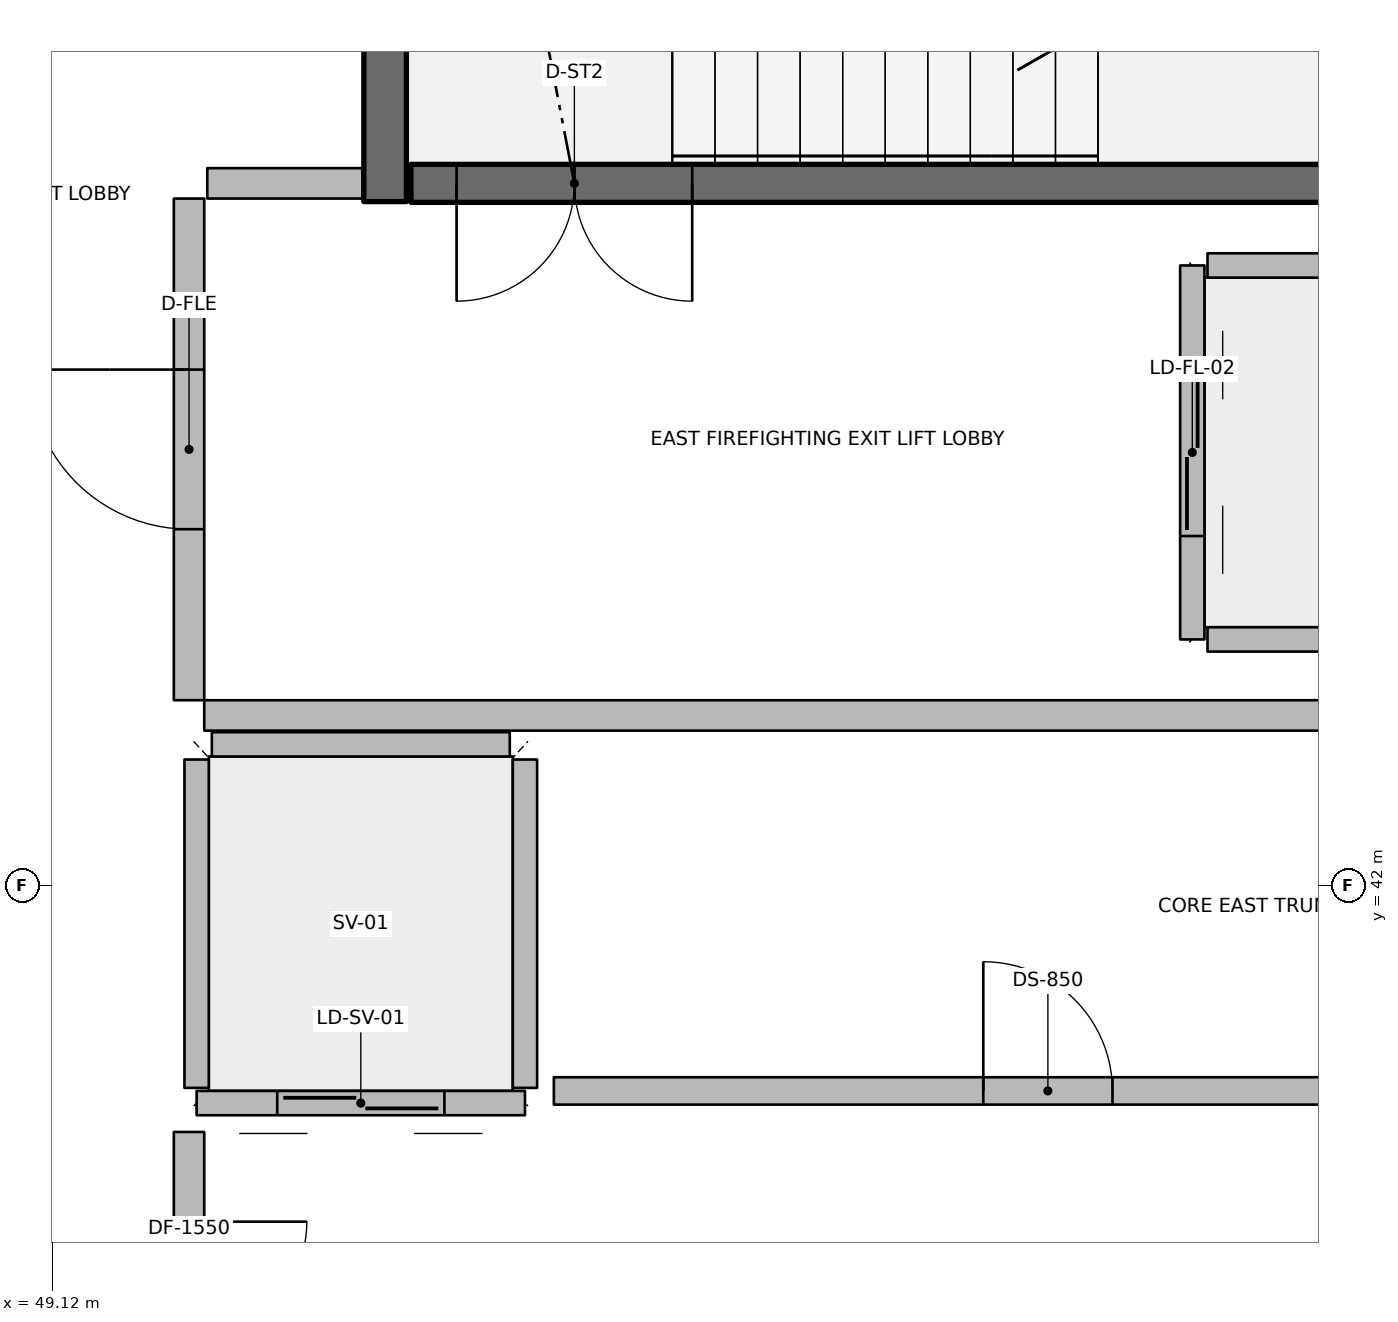
"""IFC4 building model, lengths in metres.
Left out: names, types, materials, properties, quantities, classifications, styles, units other than length and angle.
Written with IfcOpenShell. Run it as: python <this file> out.ifc"""

import sys

from ifc_helpers import new_model, si_unit, direction, frame, frame_2d, origin, origin_2d, place, context, subcontext, project, spatial, rectangle, hollow_rectangle, extrude, element, fill, save


model = new_model("IFC4")
c1 = context("Model", 3, precision=1e-05, world=origin(), true_north=direction((0.0, 1.0)))
c2 = subcontext(c1, "Body", "Model", "MODEL_VIEW")
j1 = project(units=[si_unit("LENGTHUNIT", "METRE"), si_unit("PLANEANGLEUNIT", "RADIAN")], contexts=[c1])
p1 = place(None, origin())
s1 = spatial("IfcSite", under=j1, at=p1, CompositionType="ELEMENT")
p2 = place(p1, origin())
s2 = spatial("IfcBuilding", under=s1, at=p2, CompositionType="ELEMENT")
p3 = place(p2, origin())
s3 = spatial("IfcBuildingStorey", under=s2, at=p3, CompositionType="ELEMENT", Elevation=0.0)
p4 = place(p3, frame((51.31, 46.5, 0.0), z_axis=(0.0, 0.0, 1.0), x_axis=(0.0, 1.0, 0.0)))
e1 = element("IfcWall", 1, at=p4, inside=s3, PredefinedType="SHEAR", context=c2, shape_type="SweptSolid", body=[
    extrude(rectangle(XDim=3.5, YDim=0.28, at=frame_2d((1.75, 0.0))), origin(), (0.0, 0.0, 1.0), 7.2),
])
p5 = place(p3, frame((56.0, 46.62, 0.0), z_axis=(0.0, 0.0, 1.0), x_axis=(1.0, 0.0, 0.0)))
e2 = element("IfcColumn", 2, at=p5, inside=s3, PredefinedType="COLUMN", context=c2, shape_type="SweptSolid", body=[
    extrude(hollow_rectangle(XDim=0.2, YDim=0.2, WallThickness=0.01, InnerFilletRadius=0.01, OuterFilletRadius=0.02, at=origin_2d()), origin(), (0.0, 0.0, 1.0), 1.595),
])
p6 = place(p3, frame((56.7, 46.62, 0.0), z_axis=(0.0, 0.0, 1.0), x_axis=(1.0, 0.0, 0.0)))
e3 = element("IfcColumn", 3, at=p6, inside=s3, PredefinedType="COLUMN", context=c2, shape_type="SweptSolid", body=[
    extrude(hollow_rectangle(XDim=0.2, YDim=0.2, WallThickness=0.01, InnerFilletRadius=0.01, OuterFilletRadius=0.02, at=origin_2d()), origin(), (0.0, 0.0, 1.0), 5.195),
])
p7 = place(p3, frame((51.48, 46.62, 0.0), z_axis=(0.0, 0.0, 1.0), x_axis=(1.0, 0.0, 0.0)))
e4 = element("IfcWall", 4, at=p7, inside=s3, PredefinedType="SOLIDWALL", context=c2, shape_type="SweptSolid", body=[
    extrude(rectangle(XDim=7.54, YDim=0.25, at=frame_2d((3.77, 0.0))), origin(), (0.0, 0.0, 1.0), 6.8),
])
p8 = place(p7, frame((0.3, 0.0, 0.0)))
e5 = element("IfcOpeningElement", 5, at=p8, cuts=e4, PredefinedType="OPENING", context=c2, shape_type="SweptSolid", body=[
    extrude(rectangle(XDim=1.55, YDim=2.15, at=frame_2d((0.775, 1.075))), frame((0.0, 0.135, 0.0), z_axis=(0.0, -1.0, 0.0), x_axis=(1.0, 0.0, 0.0)), (0.0, 0.0, 1.0), 0.27),
])
p9 = place(p3, frame((56.62, 46.08, 0.0), z_axis=(0.0, 0.0, 1.0), x_axis=(0.0, -1.0, 0.0)))
e6 = element("IfcWall", 6, at=p9, inside=s3, PredefinedType="PARTITIONING", context=c2, shape_type="SweptSolid", body=[
    extrude(rectangle(XDim=2.46, YDim=0.16, at=frame_2d((1.23, 0.0))), origin(), (0.0, 0.0, 1.0), 6.8),
])
p10 = place(p9, frame((0.68, 0.0, 0.0)))
e7 = element("IfcOpeningElement", 7, at=p10, cuts=e6, PredefinedType="OPENING", context=c2, shape_type="SweptSolid", body=[
    extrude(rectangle(XDim=1.1, YDim=2.1, at=frame_2d((0.55, 1.05))), frame((0.0, 0.09, 0.0), z_axis=(0.0, -1.0, 0.0), x_axis=(1.0, 0.0, 0.0)), (0.0, 0.0, 1.0), 0.18),
])
for number, where, z_axis, x_axis in (
    (8, (56.72, 46.08, 0.0), (0.0, 0.0, 1.0), (1.0, 0.0, 0.0)),
    (9, (56.72, 43.62, 0.0), (0.0, 0.0, 1.0), (1.0, 0.0, 0.0)),
):
    element("IfcWall", number, at=place(p3, frame(where, z_axis=z_axis, x_axis=x_axis)), inside=s3, PredefinedType="PARTITIONING", context=c2, shape_type="SweptSolid", body=[
        extrude(rectangle(XDim=2.06, YDim=0.16, at=frame_2d((1.03, 0.0))), origin(), (0.0, 0.0, 1.0), 6.8),
    ])
p11 = place(p3, frame((52.23, 40.57, 0.0), z_axis=(0.0, 0.0, 1.0), x_axis=(-1.0, 0.0, 0.0)))
e10 = element("IfcWall", 10, at=p11, inside=s3, PredefinedType="PARTITIONING", context=c2, shape_type="SweptSolid", body=[
    extrude(rectangle(XDim=2.16, YDim=0.16, at=frame_2d((1.08, 0.0))), origin(), (0.0, 0.0, 1.0), 6.8),
])
p12 = place(p11, frame((0.53, 0.0, 0.0)))
e11 = element("IfcOpeningElement", 11, at=p12, cuts=e10, PredefinedType="OPENING", context=c2, shape_type="SweptSolid", body=[
    extrude(rectangle(XDim=1.1, YDim=2.1, at=frame_2d((0.55, 1.05))), frame((0.0, 0.09, 0.0), z_axis=(0.0, -1.0, 0.0), x_axis=(1.0, 0.0, 0.0)), (0.0, 0.0, 1.0), 0.18),
])
for number, where, z_axis, x_axis in (
    (12, (52.23, 40.67, 0.0), (0.0, 0.0, 1.0), (0.0, 1.0, 0.0)),
    (13, (50.07, 40.67, 0.0), (0.0, 0.0, 1.0), (0.0, 1.0, 0.0)),
):
    element("IfcWall", number, at=place(p3, frame(where, z_axis=z_axis, x_axis=x_axis)), inside=s3, PredefinedType="PARTITIONING", context=c2, shape_type="SweptSolid", body=[
        extrude(rectangle(XDim=2.16, YDim=0.16, at=frame_2d((1.08, 0.0))), origin(), (0.0, 0.0, 1.0), 6.8),
    ])
p13 = place(p3, frame((50.17, 42.93, 0.0), z_axis=(0.0, 0.0, 1.0), x_axis=(1.0, 0.0, 0.0)))
e14 = element("IfcWall", 14, at=p13, inside=s3, PredefinedType="PARTITIONING", context=c2, shape_type="SweptSolid", body=[
    extrude(rectangle(XDim=1.96, YDim=0.16, at=frame_2d((0.98, 0.0))), origin(), (0.0, 0.0, 1.0), 6.8),
])
p14 = place(p3, frame((52.42, 40.65, 0.0), z_axis=(0.0, 0.0, 1.0), x_axis=(1.0, 0.0, 0.0)))
e15 = element("IfcWall", 15, at=p14, inside=s3, PredefinedType="PARTITIONING", context=c2, shape_type="SweptSolid", body=[
    extrude(rectangle(XDim=6.5, YDim=0.18, at=frame_2d((3.25, 0.0))), origin(), (0.0, 0.0, 1.0), 6.8),
])
p15 = place(p14, frame((2.825, 0.0, 0.0)))
e16 = element("IfcOpeningElement", 16, at=p15, cuts=e15, PredefinedType="OPENING", context=c2, shape_type="SweptSolid", body=[
    extrude(rectangle(XDim=0.85, YDim=2.06, at=frame_2d((0.425, 1.03))), frame((0.0, 0.1, 0.0), z_axis=(0.0, -1.0, 0.0), x_axis=(1.0, 0.0, 0.0)), (0.0, 0.0, 1.0), 0.2),
])
p16 = place(p3, frame((50.02, 37.65, 0.0), z_axis=(0.0, 0.0, 1.0), x_axis=(0.0, 1.0, 0.0)))
e17 = element("IfcWall", 17, at=p16, inside=s3, PredefinedType="PARTITIONING", context=c2, shape_type="SweptSolid", body=[
    extrude(rectangle(XDim=2.73, YDim=0.2, at=frame_2d((1.365, 0.0))), origin(), (0.0, 0.0, 1.0), 6.8),
])
p17 = place(p16, frame((0.59, 0.0, 0.0)))
e18 = element("IfcOpeningElement", 18, at=p17, cuts=e17, PredefinedType="OPENING", context=c2, shape_type="SweptSolid", body=[
    extrude(rectangle(XDim=1.55, YDim=2.15, at=frame_2d((0.775, 1.075))), frame((0.0, 0.11, 0.0), z_axis=(0.0, -1.0, 0.0), x_axis=(1.0, 0.0, 0.0)), (0.0, 0.0, 1.0), 0.22),
])
p18 = place(p3, frame((50.12, 43.12, 0.0), z_axis=(0.0, 0.0, 1.0), x_axis=(1.0, 0.0, 0.0)))
e19 = element("IfcWall", 19, at=p18, inside=s3, PredefinedType="PARTITIONING", context=c2, shape_type="SweptSolid", body=[
    extrude(rectangle(XDim=8.88, YDim=0.2, at=frame_2d((4.44, 0.0))), origin(), (0.0, 0.0, 1.0), 6.8),
])
p19 = place(p3, frame((50.14, 46.62, 0.0), z_axis=(0.0, 0.0, 1.0), x_axis=(1.0, 0.0, 0.0)))
e20 = element("IfcWall", 20, at=p19, inside=s3, PredefinedType="PARTITIONING", context=c2, shape_type="SweptSolid", body=[
    extrude(rectangle(XDim=1.02, YDim=0.2, at=frame_2d((0.51, 0.0))), origin(), (0.0, 0.0, 1.0), 6.8),
])
p20 = place(p3, frame((50.02, 43.22, 0.0), z_axis=(0.0, 0.0, 1.0), x_axis=(0.0, 1.0, 0.0)))
e21 = element("IfcWall", 21, at=p20, inside=s3, PredefinedType="PARTITIONING", context=c2, shape_type="SweptSolid", body=[
    extrude(rectangle(XDim=3.3, YDim=0.2, at=frame_2d((1.65, 0.0))), origin(), (0.0, 0.0, 1.0), 6.8),
])
p21 = place(p20, frame((1.125, 0.0, 0.0)))
e22 = element("IfcOpeningElement", 22, at=p21, cuts=e21, PredefinedType="OPENING", context=c2, shape_type="SweptSolid", body=[
    extrude(rectangle(XDim=1.05, YDim=2.1, at=frame_2d((0.525, 1.05))), frame((0.0, 0.11, 0.0), z_axis=(0.0, -1.0, 0.0), x_axis=(1.0, 0.0, 0.0)), (0.0, 0.0, 1.0), 0.22),
])
p22 = place(p8, origin())
e23 = element("IfcDoor", 23, at=p22, inside=s3, OperationType="DOUBLE_DOOR_SINGLE_SWING", PredefinedType="DOOR", context=c2, shape_type="SweptSolid", body=[
    extrude(rectangle(XDim=1.55, YDim=2.15, at=frame_2d((0.775, 1.075))), frame((0.0, 0.025, 0.0), z_axis=(0.0, -1.0, 0.0), x_axis=(1.0, 0.0, 0.0)), (0.0, 0.0, 1.0), 0.05),
])
fill(e5, e23)
p23 = place(p10, origin())
e24 = element("IfcDoor", 24, at=p23, inside=s3, OperationType="DOUBLE_DOOR_SLIDING", PredefinedType="DOOR", context=c2, shape_type="SweptSolid", body=[
    extrude(rectangle(XDim=1.1, YDim=2.1, at=frame_2d((0.55, 1.05))), frame((0.0, 0.025, 0.0), z_axis=(0.0, -1.0, 0.0), x_axis=(1.0, 0.0, 0.0)), (0.0, 0.0, 1.0), 0.05),
])
fill(e7, e24)
p24 = place(p12, origin())
e25 = element("IfcDoor", 25, at=p24, inside=s3, OperationType="DOUBLE_DOOR_SLIDING", PredefinedType="DOOR", context=c2, shape_type="SweptSolid", body=[
    extrude(rectangle(XDim=1.1, YDim=2.1, at=frame_2d((0.55, 1.05))), frame((0.0, 0.025, 0.0), z_axis=(0.0, -1.0, 0.0), x_axis=(1.0, 0.0, 0.0)), (0.0, 0.0, 1.0), 0.05),
])
fill(e11, e25)
p25 = place(p15, origin())
e26 = element("IfcDoor", 26, at=p25, inside=s3, OperationType="SINGLE_SWING_LEFT", PredefinedType="DOOR", context=c2, shape_type="SweptSolid", body=[
    extrude(rectangle(XDim=0.85, YDim=2.06, at=frame_2d((0.425, 1.03))), frame((0.0, 0.025, 0.0), z_axis=(0.0, -1.0, 0.0), x_axis=(1.0, 0.0, 0.0)), (0.0, 0.0, 1.0), 0.05),
])
fill(e16, e26)
p26 = place(p17, origin())
e27 = element("IfcDoor", 27, at=p26, inside=s3, OperationType="DOUBLE_DOOR_SINGLE_SWING", PredefinedType="DOOR", context=c2, shape_type="SweptSolid", body=[
    extrude(rectangle(XDim=1.55, YDim=2.15, at=frame_2d((0.775, 1.075))), frame((0.0, 0.025, 0.0), z_axis=(0.0, -1.0, 0.0), x_axis=(1.0, 0.0, 0.0)), (0.0, 0.0, 1.0), 0.05),
])
fill(e18, e27)
p27 = place(p21, origin())
e28 = element("IfcDoor", 28, at=p27, inside=s3, OperationType="SINGLE_SWING_RIGHT", PredefinedType="DOOR", context=c2, shape_type="SweptSolid", body=[
    extrude(rectangle(XDim=1.05, YDim=2.1, at=frame_2d((0.525, 1.05))), frame((0.0, 0.025, 0.0), z_axis=(0.0, -1.0, 0.0), x_axis=(1.0, 0.0, 0.0)), (0.0, 0.0, 1.0), 0.05),
])
fill(e22, e28)
save(model, sys.argv[1])
